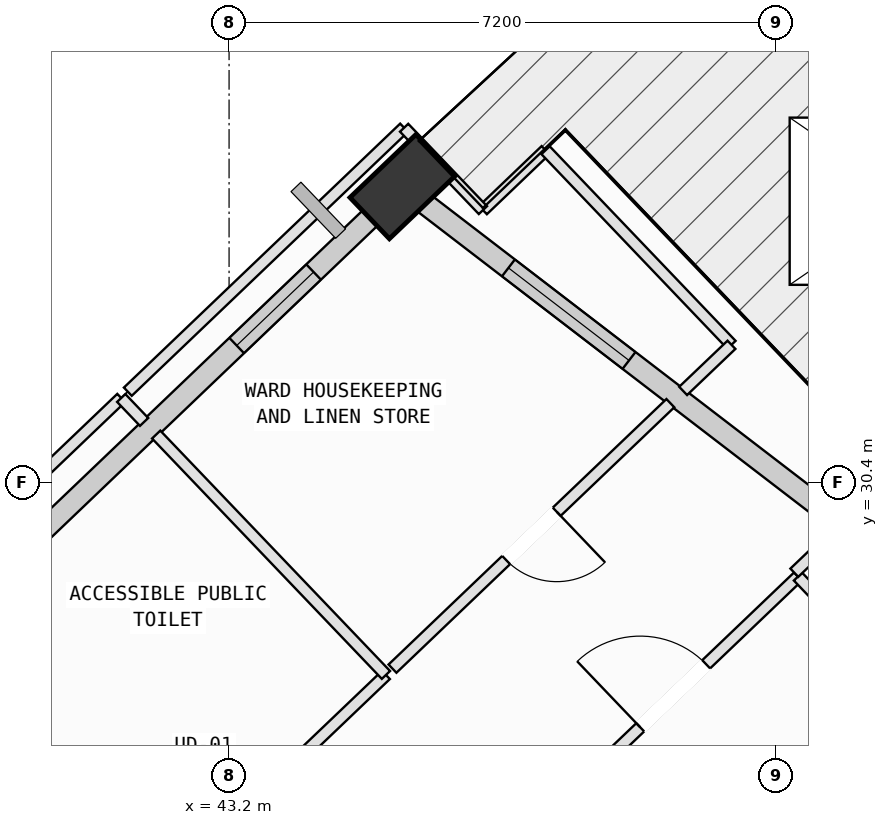
"""IFC4 building model, lengths in metres.
Left out: names, types, materials, properties, quantities, classifications, styles, units other than length and angle.
Written with IfcOpenShell. Run it as: python <this file> out.ifc"""

import sys

from ifc_helpers import new_model, si_unit, direction, frame, frame_2d, origin, origin_2d, place, context, subcontext, project, spatial, rectangle, extrude, element, fill, save


model = new_model("IFC4")
c1 = context("Model", 3, precision=1e-05, world=origin(), true_north=direction((0.0, 1.0)))
c2 = subcontext(c1, "Body", "Model", "MODEL_VIEW")
j1 = project(units=[si_unit("LENGTHUNIT", "METRE"), si_unit("PLANEANGLEUNIT", "RADIAN")], contexts=[c1])
p1 = place(None, origin())
s1 = spatial("IfcSite", under=j1, at=p1, CompositionType="ELEMENT")
p2 = place(p1, origin())
s2 = spatial("IfcBuilding", under=s1, at=p2, CompositionType="ELEMENT")
p3 = place(p2, frame((0.0, 0.0, 211.2)))
s3 = spatial("IfcBuildingStorey", under=s2, at=p3, CompositionType="ELEMENT", Elevation=211.2)
p4 = place(p3, frame((45.484, 34.293, 0.046), z_axis=(-0.039698810697, 0.048822139863, 0.998018237854), x_axis=(-0.12592619719, -0.991086577439, 0.043474002368)))
e1 = element("IfcColumn", 1, at=p4, inside=s3, PredefinedType="COLUMN", context=c2, shape_type="SweptSolid", body=[
    extrude(rectangle(XDim=1.2, YDim=0.75, at=origin_2d()), origin(), (0.0, 0.0, 1.0), 3.96),
])
p5 = place(p3, frame((45.703, 34.124, 0.0), z_axis=(0.0, 0.0, 1.0), x_axis=(0.793258339764, -0.608885216108, 0.0)))
e2 = element("IfcWall", 2, at=p5, inside=s3, PredefinedType="SOLIDWALL", context=c2, shape_type="SweptSolid", body=[
    extrude(rectangle(XDim=9.036, YDim=0.28, at=frame_2d((4.518, 0.0))), origin(), (0.0, 0.0, 1.0), 3.265),
])
p6 = place(p5, frame((1.479, 0.0, 0.75)))
e3 = element("IfcOpeningElement", 3, at=p6, cuts=e2, PredefinedType="OPENING", context=c2, shape_type="SweptSolid", body=[
    extrude(rectangle(XDim=2.0, YDim=1.95, at=frame_2d((1.0, 0.975))), frame((0.0, 0.15, 0.0), z_axis=(0.0, -1.0, 0.0), x_axis=(1.0, 0.0, 0.0)), (0.0, 0.0, 1.0), 0.3),
])
p7 = place(p3, frame((40.319, 29.353, 0.0), z_axis=(0.0, 0.0, 1.0), x_axis=(0.722967108735, 0.690882449977, 0.0)))
e4 = element("IfcWall", 4, at=p7, inside=s3, PredefinedType="SOLIDWALL", context=c2, shape_type="SweptSolid", body=[
    extrude(rectangle(XDim=6.78, YDim=0.28, at=frame_2d((3.39, 0.0))), origin(), (0.0, 0.0, 1.0), 2.765),
])
p8 = place(p7, frame((4.124, 0.0, 0.75)))
e5 = element("IfcOpeningElement", 5, at=p8, cuts=e4, PredefinedType="OPENING", context=c2, shape_type="SweptSolid", body=[
    extrude(rectangle(XDim=1.4, YDim=1.85, at=frame_2d((0.7, 0.925))), frame((0.0, 0.15, 0.0), z_axis=(0.0, -1.0, 0.0), x_axis=(1.0, 0.0, 0.0)), (0.0, 0.0, 1.0), 0.3),
])
p9 = place(p3, frame((47.402, 26.025, 0.0), z_axis=(0.0, 0.0, 1.0), x_axis=(0.722973384646, 0.690875882553, 0.0)))
e6 = element("IfcWall", 6, at=p9, inside=s3, PredefinedType="PARTITIONING", context=c2, shape_type="SweptSolid", body=[
    extrude(rectangle(XDim=4.541, YDim=0.15, at=frame_2d((2.271, 0.0))), origin(), (0.0, 0.0, 1.0), 3.78),
])
p10 = place(p9, frame((1.67, 0.0, 0.0)))
e7 = element("IfcOpeningElement", 7, at=p10, cuts=e6, PredefinedType="OPENING", context=c2, shape_type="SweptSolid", body=[
    extrude(rectangle(XDim=1.2, YDim=2.15, at=frame_2d((0.6, 1.075))), frame((0.0, 0.085, 0.0), z_axis=(0.0, -1.0, 0.0), x_axis=(1.0, 0.0, 0.0)), (0.0, 0.0, 1.0), 0.17),
])
p11 = place(p3, frame((50.685, 29.162, 0.0), z_axis=(0.0, 0.0, 1.0), x_axis=(0.690801446866, -0.723044508317, 0.0)))
e8 = element("IfcWall", 8, at=p11, inside=s3, PredefinedType="PARTITIONING", context=c2, shape_type="SweptSolid", body=[
    extrude(rectangle(XDim=10.926, YDim=0.15, at=frame_2d((5.463, 0.0))), origin(), (0.0, 0.0, 1.0), 3.78),
])
p12 = place(p11, frame((4.177, 0.0, 0.0)))
e9 = element("IfcOpeningElement", 9, at=p12, cuts=e8, PredefinedType="OPENING", context=c2, shape_type="SweptSolid", body=[
    extrude(rectangle(XDim=0.86, YDim=2.06, at=frame_2d((0.43, 1.03))), frame((0.0, 0.085, 0.0), z_axis=(0.0, -1.0, 0.0), x_axis=(1.0, 0.0, 0.0)), (0.0, 0.0, 1.0), 0.17),
])
p13 = place(p3, frame((38.453, 27.411, 0.0), z_axis=(0.0, 0.0, 1.0), x_axis=(0.690851288879, -0.722996885647, 0.0)))
e10 = element("IfcWall", 10, at=p13, inside=s3, PredefinedType="PARTITIONING", context=c2, shape_type="SweptSolid", body=[
    extrude(rectangle(XDim=4.375, YDim=0.15, at=frame_2d((2.187, 0.0))), origin(), (0.0, 0.0, 1.0), 3.415),
])
p14 = place(p3, frame((45.264, 27.868, 0.0), z_axis=(0.0, 0.0, 1.0), x_axis=(-0.723040441691, -0.690805703276, 0.0)))
e11 = element("IfcWall", 11, at=p14, inside=s3, PredefinedType="PARTITIONING", context=c2, shape_type="SweptSolid", body=[
    extrude(rectangle(XDim=5.12, YDim=0.15, at=frame_2d((2.56, 0.0))), origin(), (0.0, 0.0, 1.0), 3.78),
])
p15 = place(p14, frame((2.1, 0.0, 0.0)))
e12 = element("IfcOpeningElement", 12, at=p15, cuts=e11, PredefinedType="OPENING", context=c2, shape_type="SweptSolid", body=[
    extrude(rectangle(XDim=0.92, YDim=2.1, at=frame_2d((0.46, 1.05))), frame((0.0, 0.085, 0.0), z_axis=(0.0, -1.0, 0.0), x_axis=(1.0, 0.0, 0.0)), (0.0, 0.0, 1.0), 0.17),
])
p16 = place(p3, frame((38.08, 27.974, 0.0), z_axis=(0.0, 0.0, 1.0), x_axis=(0.7228541217, 0.69100066479, 0.0)))
e13 = element("IfcWall", 13, at=p16, inside=s3, PredefinedType="PARTITIONING", context=c2, shape_type="SweptSolid", body=[
    extrude(rectangle(XDim=5.12, YDim=0.15, at=frame_2d((2.56, 0.0))), origin(), (0.0, 0.0, 1.0), 3.265),
])
p17 = place(p3, frame((41.781, 31.512, 0.0), z_axis=(0.0, 0.0, 1.0), x_axis=(0.690955405994, -0.7228973834, 0.0)))
e14 = element("IfcWall", 14, at=p17, inside=s3, PredefinedType="PARTITIONING", context=c2, shape_type="SweptSolid", body=[
    extrude(rectangle(XDim=0.436, YDim=0.15, at=frame_2d((0.218, 0.0))), origin(), (0.0, 0.0, 1.0), 3.78),
])
p18 = place(p3, frame((42.241, 31.031, 0.0), z_axis=(0.0, 0.0, 1.0), x_axis=(0.690910919036, -0.722939902037, 0.0)))
e15 = element("IfcWall", 15, at=p18, inside=s3, PredefinedType="PARTITIONING", context=c2, shape_type="SweptSolid", body=[
    extrude(rectangle(XDim=4.375, YDim=0.15, at=frame_2d((2.188, 0.0))), origin(), (0.0, 0.0, 1.0), 3.78),
])
p19 = place(p3, frame((46.54, 33.984, 0.0), z_axis=(0.0, 0.0, 1.0), x_axis=(0.722669758254, 0.69119347545, 0.0)))
e16 = element("IfcWall", 16, at=p19, inside=s3, PredefinedType="PARTITIONING", context=c2, shape_type="SweptSolid", body=[
    extrude(rectangle(XDim=1.14, YDim=0.15, at=frame_2d((0.57, 0.0))), origin(), (0.0, 0.0, 1.0), 3.78),
])
p20 = place(p3, frame((47.364, 34.772, 0.0), z_axis=(0.0, 0.0, 1.0), x_axis=(0.690823330697, -0.723023599729, 0.0)))
e17 = element("IfcWall", 17, at=p20, inside=s3, PredefinedType="PARTITIONING", context=c2, shape_type="SweptSolid", body=[
    extrude(rectangle(XDim=3.541, YDim=0.15, at=frame_2d((1.771, 0.0))), origin(), (0.0, 0.0, 1.0), 3.78),
])
p21 = place(p3, frame((49.81, 32.212, 0.0), z_axis=(0.0, 0.0, 1.0), x_axis=(-0.72343750136, -0.690389876538, 0.0)))
e18 = element("IfcWall", 18, at=p21, inside=s3, PredefinedType="PARTITIONING", context=c2, shape_type="SweptSolid", body=[
    extrude(rectangle(XDim=0.879, YDim=0.15, at=frame_2d((0.439, 0.0))), origin(), (0.0, 0.0, 1.0), 3.78),
])
p22 = place(p3, frame((49.006, 31.444, 0.0), z_axis=(0.0, 0.0, 1.0), x_axis=(-0.723025524687, -0.690821316008, 0.0)))
e19 = element("IfcWall", 19, at=p22, inside=s3, PredefinedType="PARTITIONING", context=c2, shape_type="SweptSolid", body=[
    extrude(rectangle(XDim=5.057, YDim=0.15, at=frame_2d((2.528, 0.0))), origin(), (0.0, 0.0, 1.0), 3.78),
])
p23 = place(p22, frame((2.068, 0.0, 0.0)))
e20 = element("IfcOpeningElement", 20, at=p23, cuts=e19, PredefinedType="OPENING", context=c2, shape_type="SweptSolid", body=[
    extrude(rectangle(XDim=0.92, YDim=2.1, at=frame_2d((0.46, 1.05))), frame((0.0, 0.085, 0.0), z_axis=(0.0, -1.0, 0.0), x_axis=(1.0, 0.0, 0.0)), (0.0, 0.0, 1.0), 0.17),
])
p24 = place(p3, frame((41.868, 31.595, 0.0), z_axis=(0.0, 0.0, 1.0), x_axis=(0.723021413842, 0.690825618464, 0.0)))
e21 = element("IfcWall", 21, at=p24, inside=s3, PredefinedType="PARTITIONING", context=c2, shape_type="SweptSolid", body=[
    extrude(rectangle(XDim=5.028, YDim=0.15, at=frame_2d((2.514, 0.0))), origin(), (0.0, 0.0, 1.0), 2.765),
])
p25 = place(p3, frame((45.503, 35.068, 0.0), z_axis=(0.0, 0.0, 1.0), x_axis=(0.691230034945, -0.722634789358, 0.0)))
e22 = element("IfcWall", 22, at=p25, inside=s3, PredefinedType="PARTITIONING", context=c2, shape_type="SweptSolid", body=[
    extrude(rectangle(XDim=1.5, YDim=0.15, at=frame_2d((0.75, 0.0))), origin(), (0.0, 0.0, 1.0), 3.265),
])
p26 = place(p3, frame((50.637, 29.213, 0.0), z_axis=(0.0, 0.0, 1.0), x_axis=(0.722770010061, 0.691088643053, 0.0)))
e23 = element("IfcWall", 23, at=p26, inside=s3, PredefinedType="PARTITIONING", context=c2, shape_type="SweptSolid", body=[
    extrude(rectangle(XDim=0.786, YDim=0.15, at=frame_2d((0.393, 0.0))), origin(), (0.0, 0.0, 1.0), 3.78),
])
p27 = place(p3, frame((0.0, 0.0, -0.24)))
p28 = place(p27, frame((52.176, 34.101, 0.0)))
p29 = place(p28, frame((0.0, 0.0, 0.2)))
e24 = element("IfcWindow", 24, at=p29, inside=s3, PartitioningType="SINGLE_PANEL", PredefinedType="SKYLIGHT", context=c2, shape_type="SweptSolid", body=[
    extrude(rectangle(XDim=3.2, YDim=2.2, at=origin_2d()), origin(), (0.0, 0.0, 1.0), 0.04),
])
p30 = place(p6, origin())
e25 = element("IfcWindow", 25, at=p30, inside=s3, PartitioningType="SINGLE_PANEL", PredefinedType="WINDOW", context=c2, shape_type="SweptSolid", body=[
    extrude(rectangle(XDim=2.0, YDim=1.95, at=frame_2d((1.0, 0.975))), frame((0.0, 0.03, 0.0), z_axis=(0.0, -1.0, 0.0), x_axis=(1.0, 0.0, 0.0)), (0.0, 0.0, 1.0), 0.06),
])
fill(e3, e25)
p31 = place(p8, origin())
e26 = element("IfcWindow", 26, at=p31, inside=s3, PartitioningType="SINGLE_PANEL", PredefinedType="WINDOW", context=c2, shape_type="SweptSolid", body=[
    extrude(rectangle(XDim=1.4, YDim=1.85, at=frame_2d((0.7, 0.925))), frame((0.0, 0.03, 0.0), z_axis=(0.0, -1.0, 0.0), x_axis=(1.0, 0.0, 0.0)), (0.0, 0.0, 1.0), 0.06),
])
fill(e5, e26)
p32 = place(p10, origin())
e27 = element("IfcDoor", 27, at=p32, inside=s3, OperationType="SINGLE_SWING_LEFT", PredefinedType="DOOR", context=c2, shape_type="SweptSolid", body=[
    extrude(rectangle(XDim=1.2, YDim=2.15, at=frame_2d((0.6, 1.075))), frame((0.0, 0.025, 0.0), z_axis=(0.0, -1.0, 0.0), x_axis=(1.0, 0.0, 0.0)), (0.0, 0.0, 1.0), 0.05),
])
fill(e7, e27)
p33 = place(p23, origin())
e28 = element("IfcDoor", 28, at=p33, inside=s3, OperationType="SINGLE_SWING_LEFT", PredefinedType="DOOR", context=c2, shape_type="SweptSolid", body=[
    extrude(rectangle(XDim=0.92, YDim=2.1, at=frame_2d((0.46, 1.05))), frame((0.0, 0.025, 0.0), z_axis=(0.0, -1.0, 0.0), x_axis=(1.0, 0.0, 0.0)), (0.0, 0.0, 1.0), 0.05),
])
fill(e20, e28)
save(model, sys.argv[1])
